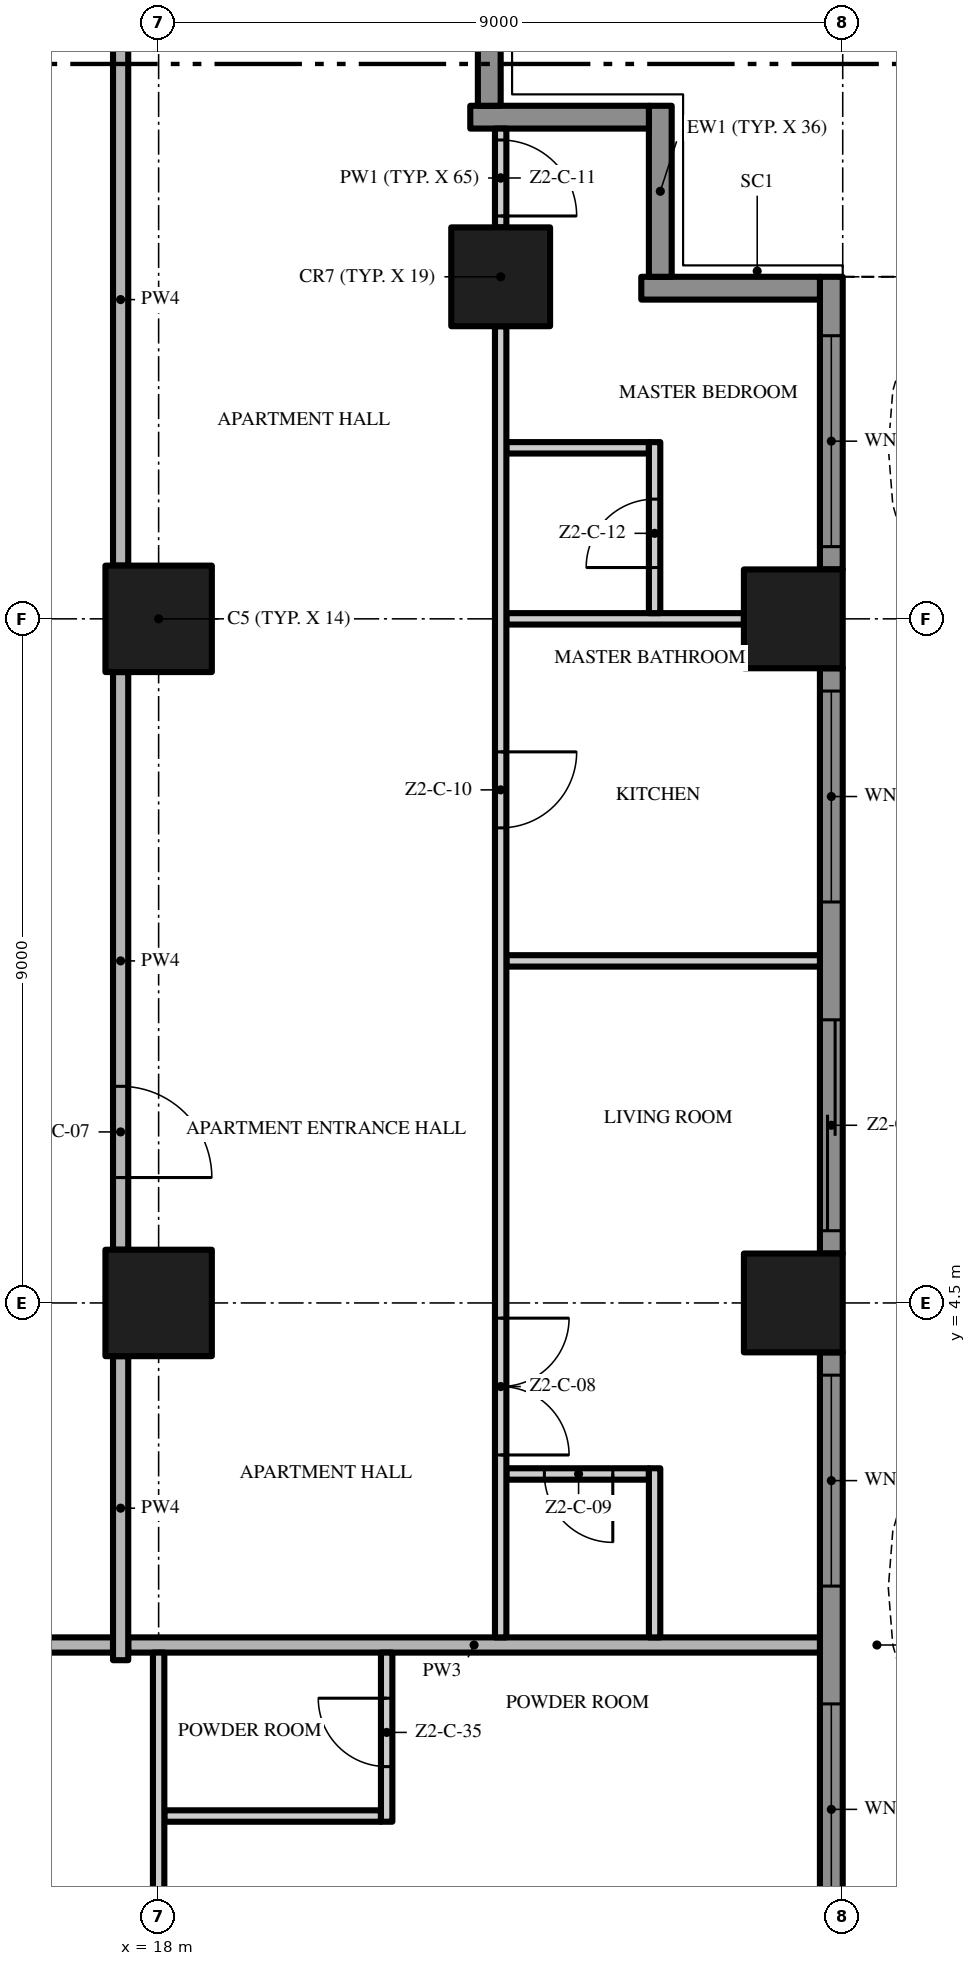
"""IFC4 building model, lengths in metres.
Left out: names, types, materials, properties, quantities, classifications, styles, units other than length and angle.
Written with IfcOpenShell. Run it as: python <this file> out.ifc"""

import sys

from ifc_helpers import new_model, si_unit, direction, frame, frame_2d, origin, origin_2d, place, context, subcontext, project, spatial, polyline, rectangle, outline, extrude, element, fill, save


model = new_model("IFC4")
c1 = context("Model", 3, precision=1e-05, world=origin(), true_north=direction((0.0, 1.0)))
c2 = subcontext(c1, "Body", "Model", "MODEL_VIEW")
j1 = project(units=[si_unit("LENGTHUNIT", "METRE"), si_unit("PLANEANGLEUNIT", "RADIAN")], contexts=[c1])
p1 = place(None, origin())
s1 = spatial("IfcSite", under=j1, at=p1, CompositionType="ELEMENT")
p2 = place(p1, origin())
s2 = spatial("IfcBuilding", under=s1, at=p2, CompositionType="ELEMENT")
p3 = place(p2, frame((0.0, 0.0, 92.2)))
s3 = spatial("IfcBuildingStorey", under=s2, at=p3, CompositionType="ELEMENT", Elevation=92.2)
for number, where, z_axis, x_axis in (
    (1, (18.0, 13.5, 0.0), (0.0, 0.0, 1.0), (1.0, 0.0, 0.0)),
    (2, (18.0, 4.5, 0.0), (0.0, 0.0, 1.0), (1.0, 0.0, 0.0)),
):
    element("IfcColumn", number, at=place(p3, frame(where, z_axis=z_axis, x_axis=x_axis)), inside=s3, PredefinedType="COLUMN", context=c2, shape_type="SweptSolid", body=[
        extrude(rectangle(XDim=1.4, YDim=1.4, at=origin_2d()), origin(), (0.0, 0.0, 1.0), 3.5),
    ])
for number, where, z_axis, x_axis in (
    (3, (26.35, 13.5, 0.0), (0.0, 0.0, 1.0), (1.0, 0.0, 0.0)),
    (4, (22.5, 18.0, 0.0), (0.0, 0.0, 1.0), (1.0, 0.0, 0.0)),
    (5, (26.35, 4.5, 0.0), (0.0, 0.0, 1.0), (1.0, 0.0, 0.0)),
):
    element("IfcColumn", number, at=place(p3, frame(where, z_axis=z_axis, x_axis=x_axis)), inside=s3, PredefinedType="COLUMN", context=c2, shape_type="SweptSolid", body=[
        extrude(rectangle(XDim=1.3, YDim=1.3, at=origin_2d()), origin(), (0.0, 0.0, 1.0), 3.5),
    ])
p4 = place(p3, frame((26.85, 3.85, 0.0), z_axis=(0.0, 0.0, 1.0), x_axis=(0.0, -1.0, 0.0)))
e6 = element("IfcWall", 6, at=p4, inside=s3, PredefinedType="SOLIDWALL", context=c2, shape_type="SweptSolid", body=[
    extrude(rectangle(XDim=7.7, YDim=0.3, at=frame_2d((3.85, 0.0))), origin(), (0.0, 0.0, 1.0), 3.5),
])
p5 = place(p4, frame((4.625, 0.0, 0.45)))
e7 = element("IfcOpeningElement", 7, at=p5, cuts=e6, PredefinedType="OPENING", context=c2, shape_type="SweptSolid", body=[
    extrude(rectangle(XDim=2.775, YDim=2.65, at=frame_2d((1.387, 1.325))), frame((0.0, 0.16, 0.0), z_axis=(0.0, -1.0, 0.0), x_axis=(1.0, 0.0, 0.0)), (0.0, 0.0, 1.0), 0.32),
])
p6 = place(p4, frame((0.3, 0.0, 0.45)))
e8 = element("IfcOpeningElement", 8, at=p6, cuts=e6, PredefinedType="OPENING", context=c2, shape_type="SweptSolid", body=[
    extrude(rectangle(XDim=2.775, YDim=2.65, at=frame_2d((1.387, 1.325))), frame((0.0, 0.16, 0.0), z_axis=(0.0, -1.0, 0.0), x_axis=(1.0, 0.0, 0.0)), (0.0, 0.0, 1.0), 0.32),
])
p7 = place(p3, frame((26.85, 12.85, 0.0), z_axis=(0.0, 0.0, 1.0), x_axis=(0.0, -1.0, 0.0)))
e9 = element("IfcWall", 9, at=p7, inside=s3, PredefinedType="SOLIDWALL", context=c2, shape_type="SweptSolid", body=[
    extrude(rectangle(XDim=7.7, YDim=0.3, at=frame_2d((3.85, 0.0))), origin(), (0.0, 0.0, 1.0), 3.5),
])
p8 = place(p7, frame((4.625, 0.0, 0.0)))
e10 = element("IfcOpeningElement", 10, at=p8, cuts=e9, PredefinedType="OPENING", context=c2, shape_type="SweptSolid", body=[
    extrude(rectangle(XDim=2.775, YDim=2.4, at=frame_2d((1.387, 1.2))), frame((0.0, 0.16, 0.0), z_axis=(0.0, -1.0, 0.0), x_axis=(1.0, 0.0, 0.0)), (0.0, 0.0, 1.0), 0.32),
])
p9 = place(p7, frame((0.3, 0.0, 0.45)))
e11 = element("IfcOpeningElement", 11, at=p9, cuts=e9, PredefinedType="OPENING", context=c2, shape_type="SweptSolid", body=[
    extrude(rectangle(XDim=2.775, YDim=2.65, at=frame_2d((1.387, 1.325))), frame((0.0, 0.16, 0.0), z_axis=(0.0, -1.0, 0.0), x_axis=(1.0, 0.0, 0.0)), (0.0, 0.0, 1.0), 0.32),
])
p10 = place(p3, frame((26.85, 18.0, 0.0), z_axis=(0.0, 0.0, 1.0), x_axis=(0.0, -1.0, 0.0)))
e12 = element("IfcWall", 12, at=p10, inside=s3, PredefinedType="SOLIDWALL", context=c2, shape_type="SweptSolid", body=[
    extrude(rectangle(XDim=3.85, YDim=0.3, at=frame_2d((1.925, 0.0))), origin(), (0.0, 0.0, 1.0), 3.5),
])
p11 = place(p10, frame((0.775, 0.0, 0.45)))
e13 = element("IfcOpeningElement", 13, at=p11, cuts=e12, PredefinedType="OPENING", context=c2, shape_type="SweptSolid", body=[
    extrude(rectangle(XDim=2.775, YDim=2.65, at=frame_2d((1.387, 1.325))), frame((0.0, 0.16, 0.0), z_axis=(0.0, -1.0, 0.0), x_axis=(1.0, 0.0, 0.0)), (0.0, 0.0, 1.0), 0.32),
])
p12 = place(p3, frame((24.35, 17.85, 0.0), z_axis=(0.0, 0.0, 1.0), x_axis=(1.0, 0.0, 0.0)))
e14 = element("IfcWall", 14, at=p12, inside=s3, PredefinedType="SOLIDWALL", context=c2, shape_type="SweptSolid", body=[
    extrude(rectangle(XDim=2.35, YDim=0.3, at=frame_2d((1.175, 0.0))), origin(), (0.0, 0.0, 1.0), 3.5),
])
p13 = place(p3, frame((24.6, 20.25, 0.0), z_axis=(0.0, 0.0, 1.0), x_axis=(0.0, -1.0, 0.0)))
e15 = element("IfcWall", 15, at=p13, inside=s3, PredefinedType="SOLIDWALL", context=c2, shape_type="SweptSolid", body=[
    extrude(rectangle(XDim=2.25, YDim=0.3, at=frame_2d((1.125, 0.0))), origin(), (0.0, 0.0, 1.0), 3.5),
])
p14 = place(p3, frame((22.1, 20.1, 0.0), z_axis=(0.0, 0.0, 1.0), x_axis=(1.0, 0.0, 0.0)))
e16 = element("IfcWall", 16, at=p14, inside=s3, PredefinedType="SOLIDWALL", context=c2, shape_type="SweptSolid", body=[
    extrude(rectangle(XDim=2.35, YDim=0.3, at=frame_2d((1.175, 0.0))), origin(), (0.0, 0.0, 1.0), 3.5),
])
p15 = place(p3, frame((22.35, 22.5, 0.0), z_axis=(0.0, 0.0, 1.0), x_axis=(0.0, -1.0, 0.0)))
e17 = element("IfcWall", 17, at=p15, inside=s3, PredefinedType="SOLIDWALL", context=c2, shape_type="SweptSolid", body=[
    extrude(rectangle(XDim=2.25, YDim=0.3, at=frame_2d((1.125, 0.0))), origin(), (0.0, 0.0, 1.0), 3.5),
])
p16 = place(p3, origin())
e18 = element("IfcWall", 18, at=p16, inside=s3, PredefinedType="USERDEFINED", context=c2, shape_type="SweptSolid", body=[
    extrude(outline(polyline([(28.8, -18.0), (28.095, -16.5), (27.659, -15.0), (27.6, -14.25), (27.659, -13.5), (28.095, -12.0), (28.8, -10.5), (29.505, -9.0), (29.941, -7.5), (30.0, -6.75), (29.941, -6.0), (29.505, -4.5), (28.8, -3.0), (28.095, -1.5), (27.659, 0.0), (27.6, 0.75), (27.659, 1.5), (28.095, 3.0), (28.8, 4.5), (29.505, 6.0), (29.941, 7.5), (30.0, 8.25), (29.941, 9.0), (29.505, 10.5), (28.8, 12.0), (28.095, 13.5), (27.659, 15.0), (27.6, 15.75), (27.659, 16.5), (28.095, 18.0), (27.855, 18.07), (27.411, 16.545), (27.349, 15.75), (27.411, 14.955), (27.86, 13.411), (28.574, 11.894), (29.271, 10.411), (29.694, 8.955), (29.749, 8.25), (29.694, 7.545), (29.271, 6.089), (28.574, 4.606), (27.86, 3.089), (27.411, 1.545), (27.349, 0.75), (27.411, -0.045), (27.86, -1.589), (28.574, -3.106), (29.271, -4.589), (29.694, -6.045), (29.749, -6.75), (29.694, -7.455), (29.271, -8.911), (28.574, -10.394), (27.86, -11.911), (27.411, -13.455), (27.349, -14.25), (27.411, -15.045), (27.86, -16.589), (28.574, -18.106), (28.8, -18.0)])), origin(), (0.0, 0.0, 1.0), 0.9),
])
p17 = place(p3, frame((18.075, -2.25, 0.0), z_axis=(0.0, 0.0, 1.0), x_axis=(1.0, 0.0, 0.0)))
e19 = element("IfcWall", 19, at=p17, inside=s3, PredefinedType="PARTITIONING", context=c2, shape_type="SweptSolid", body=[
    extrude(rectangle(XDim=2.85, YDim=0.15, at=frame_2d((1.425, 0.0))), origin(), (0.0, 0.0, 1.0), 3.5),
])
p18 = place(p3, frame((4.6, 0.0, 0.0), z_axis=(0.0, 0.0, 1.0), x_axis=(1.0, 0.0, 0.0)))
e20 = element("IfcWall", 20, at=p18, inside=s3, PredefinedType="PARTITIONING", context=c2, shape_type="SweptSolid", body=[
    extrude(rectangle(XDim=12.8, YDim=0.2, at=frame_2d((6.4, 0.0))), origin(), (0.0, 0.0, 1.0), 3.5),
])
p19 = place(p3, frame((17.6, 0.0, 0.0), z_axis=(0.0, 0.0, 1.0), x_axis=(1.0, 0.0, 0.0)))
e21 = element("IfcWall", 21, at=p19, inside=s3, PredefinedType="PARTITIONING", context=c2, shape_type="SweptSolid", body=[
    extrude(rectangle(XDim=9.1, YDim=0.2, at=frame_2d((4.55, 0.0))), origin(), (0.0, 0.0, 1.0), 3.5),
])
p20 = place(p3, frame((24.45, 2.25, 0.0), z_axis=(0.0, 0.0, 1.0), x_axis=(-1.0, 0.0, 0.0)))
e22 = element("IfcWall", 22, at=p20, inside=s3, PredefinedType="PARTITIONING", context=c2, shape_type="SweptSolid", body=[
    extrude(rectangle(XDim=1.875, YDim=0.15, at=frame_2d((0.938, 0.0))), origin(), (0.0, 0.0, 1.0), 3.5),
])
p21 = place(p20, frame((0.475, 0.0, 0.0)))
e23 = element("IfcOpeningElement", 23, at=p21, cuts=e22, PredefinedType="OPENING", context=c2, shape_type="SweptSolid", body=[
    extrude(rectangle(XDim=0.9, YDim=2.1, at=frame_2d((0.45, 1.05))), frame((0.0, 0.085, 0.0), z_axis=(0.0, -1.0, 0.0), x_axis=(1.0, 0.0, 0.0)), (0.0, 0.0, 1.0), 0.17),
])
p22 = place(p3, frame((22.575, 9.0, 0.0), z_axis=(0.0, 0.0, 1.0), x_axis=(1.0, 0.0, 0.0)))
e24 = element("IfcWall", 24, at=p22, inside=s3, PredefinedType="PARTITIONING", context=c2, shape_type="SweptSolid", body=[
    extrude(rectangle(XDim=4.125, YDim=0.15, at=frame_2d((2.062, 0.0))), origin(), (0.0, 0.0, 1.0), 3.5),
])
p23 = place(p3, frame((22.575, 13.5, 0.0), z_axis=(0.0, 0.0, 1.0), x_axis=(1.0, 0.0, 0.0)))
e25 = element("IfcWall", 25, at=p23, inside=s3, PredefinedType="PARTITIONING", context=c2, shape_type="SweptSolid", body=[
    extrude(rectangle(XDim=3.125, YDim=0.15, at=frame_2d((1.562, 0.0))), origin(), (0.0, 0.0, 1.0), 3.5),
])
p24 = place(p3, frame((22.575, 15.75, 0.0), z_axis=(0.0, 0.0, 1.0), x_axis=(1.0, 0.0, 0.0)))
e26 = element("IfcWall", 26, at=p24, inside=s3, PredefinedType="PARTITIONING", context=c2, shape_type="SweptSolid", body=[
    extrude(rectangle(XDim=1.875, YDim=0.15, at=frame_2d((0.938, 0.0))), origin(), (0.0, 0.0, 1.0), 3.5),
])
p25 = place(p3, frame((17.5, -0.2, 0.0), z_axis=(0.0, 0.0, 1.0), x_axis=(0.0, 1.0, 0.0)))
e27 = element("IfcWall", 27, at=p25, inside=s3, PredefinedType="PARTITIONING", context=c2, shape_type="SweptSolid", body=[
    extrude(rectangle(XDim=4.0, YDim=0.2, at=frame_2d((2.0, 0.0))), origin(), (0.0, 0.0, 1.0), 3.5),
])
p26 = place(p3, frame((17.5, 12.8, 0.0), z_axis=(0.0, 0.0, 1.0), x_axis=(0.0, -1.0, 0.0)))
e28 = element("IfcWall", 28, at=p26, inside=s3, PredefinedType="PARTITIONING", context=c2, shape_type="SweptSolid", body=[
    extrude(rectangle(XDim=7.6, YDim=0.2, at=frame_2d((3.8, 0.0))), origin(), (0.0, 0.0, 1.0), 3.5),
])
p27 = place(p26, frame((5.45, 0.0, 0.0)))
e29 = element("IfcOpeningElement", 29, at=p27, cuts=e28, PredefinedType="OPENING", context=c2, shape_type="SweptSolid", body=[
    extrude(rectangle(XDim=1.2, YDim=2.4, at=frame_2d((0.6, 1.2))), frame((0.0, 0.11, 0.0), z_axis=(0.0, -1.0, 0.0), x_axis=(1.0, 0.0, 0.0)), (0.0, 0.0, 1.0), 0.22),
])
p28 = place(p3, frame((17.5, 14.2, 0.0), z_axis=(0.0, 0.0, 1.0), x_axis=(0.0, 1.0, 0.0)))
e30 = element("IfcWall", 30, at=p28, inside=s3, PredefinedType="PARTITIONING", context=c2, shape_type="SweptSolid", body=[
    extrude(rectangle(XDim=7.0, YDim=0.2, at=frame_2d((3.5, 0.0))), origin(), (0.0, 0.0, 1.0), 3.5),
])
p29 = place(p3, frame((18.0, -3.8, 0.0), z_axis=(0.0, 0.0, 1.0), x_axis=(0.0, 1.0, 0.0)))
e31 = element("IfcWall", 31, at=p29, inside=s3, PredefinedType="PARTITIONING", context=c2, shape_type="SweptSolid", body=[
    extrude(rectangle(XDim=3.7, YDim=0.15, at=frame_2d((1.85, 0.0))), origin(), (0.0, 0.0, 1.0), 3.5),
])
p30 = place(p3, frame((21.0, -2.325, 0.0), z_axis=(0.0, 0.0, 1.0), x_axis=(0.0, 1.0, 0.0)))
e32 = element("IfcWall", 32, at=p30, inside=s3, PredefinedType="PARTITIONING", context=c2, shape_type="SweptSolid", body=[
    extrude(rectangle(XDim=2.225, YDim=0.15, at=frame_2d((1.113, 0.0))), origin(), (0.0, 0.0, 1.0), 3.5),
])
p31 = place(p30, frame((0.725, 0.0, 0.0)))
e33 = element("IfcOpeningElement", 33, at=p31, cuts=e32, PredefinedType="OPENING", context=c2, shape_type="SweptSolid", body=[
    extrude(rectangle(XDim=0.9, YDim=2.1, at=frame_2d((0.45, 1.05))), frame((0.0, 0.085, 0.0), z_axis=(0.0, -1.0, 0.0), x_axis=(1.0, 0.0, 0.0)), (0.0, 0.0, 1.0), 0.17),
])
p32 = place(p3, frame((22.5, 17.35, 0.0), z_axis=(0.0, 0.0, 1.0), x_axis=(0.0, -1.0, 0.0)))
e34 = element("IfcWall", 34, at=p32, inside=s3, PredefinedType="PARTITIONING", context=c2, shape_type="SweptSolid", body=[
    extrude(rectangle(XDim=17.25, YDim=0.15, at=frame_2d((8.625, 0.0))), origin(), (0.0, 0.0, 1.0), 3.5),
])
p33 = place(p32, frame((13.05, 0.0, 0.0)))
e35 = element("IfcOpeningElement", 35, at=p33, cuts=e34, PredefinedType="OPENING", context=c2, shape_type="SweptSolid", body=[
    extrude(rectangle(XDim=1.8, YDim=2.4, at=frame_2d((0.9, 1.2))), frame((0.0, 0.085, 0.0), z_axis=(0.0, -1.0, 0.0), x_axis=(1.0, 0.0, 0.0)), (0.0, 0.0, 1.0), 0.17),
])
p34 = place(p32, frame((5.6, 0.0, 0.0)))
e36 = element("IfcOpeningElement", 36, at=p34, cuts=e34, PredefinedType="OPENING", context=c2, shape_type="SweptSolid", body=[
    extrude(rectangle(XDim=1.0, YDim=2.4, at=frame_2d((0.5, 1.2))), frame((0.0, 0.085, 0.0), z_axis=(0.0, -1.0, 0.0), x_axis=(1.0, 0.0, 0.0)), (0.0, 0.0, 1.0), 0.17),
])
p35 = place(p3, frame((22.5, 19.95, 0.0), z_axis=(0.0, 0.0, 1.0), x_axis=(0.0, -1.0, 0.0)))
e37 = element("IfcWall", 37, at=p35, inside=s3, PredefinedType="PARTITIONING", context=c2, shape_type="SweptSolid", body=[
    extrude(rectangle(XDim=1.3, YDim=0.15, at=frame_2d((0.65, 0.0))), origin(), (0.0, 0.0, 1.0), 3.5),
])
p36 = place(p35, frame((0.15, 0.0, 0.0)))
e38 = element("IfcOpeningElement", 38, at=p36, cuts=e37, PredefinedType="OPENING", context=c2, shape_type="SweptSolid", body=[
    extrude(rectangle(XDim=1.0, YDim=2.4, at=frame_2d((0.5, 1.2))), frame((0.0, 0.085, 0.0), z_axis=(0.0, -1.0, 0.0), x_axis=(1.0, 0.0, 0.0)), (0.0, 0.0, 1.0), 0.17),
])
p37 = place(p3, frame((24.525, 0.1, 0.0), z_axis=(0.0, 0.0, 1.0), x_axis=(0.0, 1.0, 0.0)))
e39 = element("IfcWall", 39, at=p37, inside=s3, PredefinedType="PARTITIONING", context=c2, shape_type="SweptSolid", body=[
    extrude(rectangle(XDim=2.225, YDim=0.15, at=frame_2d((1.113, 0.0))), origin(), (0.0, 0.0, 1.0), 3.5),
])
p38 = place(p3, frame((24.525, 13.575, 0.0), z_axis=(0.0, 0.0, 1.0), x_axis=(0.0, 1.0, 0.0)))
e40 = element("IfcWall", 40, at=p38, inside=s3, PredefinedType="PARTITIONING", context=c2, shape_type="SweptSolid", body=[
    extrude(rectangle(XDim=2.25, YDim=0.15, at=frame_2d((1.125, 0.0))), origin(), (0.0, 0.0, 1.0), 3.5),
])
p39 = place(p38, frame((0.6, 0.0, 0.0)))
e41 = element("IfcOpeningElement", 41, at=p39, cuts=e40, PredefinedType="OPENING", context=c2, shape_type="SweptSolid", body=[
    extrude(rectangle(XDim=0.9, YDim=2.1, at=frame_2d((0.45, 1.05))), frame((0.0, 0.085, 0.0), z_axis=(0.0, -1.0, 0.0), x_axis=(1.0, 0.0, 0.0)), (0.0, 0.0, 1.0), 0.17),
])
p40 = place(p5, origin())
e42 = element("IfcWindow", 42, at=p40, inside=s3, PartitioningType="SINGLE_PANEL", PredefinedType="WINDOW", context=c2, shape_type="SweptSolid", body=[
    extrude(rectangle(XDim=2.775, YDim=2.65, at=frame_2d((1.387, 1.325))), frame((0.0, 0.03, 0.0), z_axis=(0.0, -1.0, 0.0), x_axis=(1.0, 0.0, 0.0)), (0.0, 0.0, 1.0), 0.06),
])
fill(e7, e42)
p41 = place(p6, origin())
e43 = element("IfcWindow", 43, at=p41, inside=s3, PartitioningType="SINGLE_PANEL", PredefinedType="WINDOW", context=c2, shape_type="SweptSolid", body=[
    extrude(rectangle(XDim=2.775, YDim=2.65, at=frame_2d((1.387, 1.325))), frame((0.0, 0.03, 0.0), z_axis=(0.0, -1.0, 0.0), x_axis=(1.0, 0.0, 0.0)), (0.0, 0.0, 1.0), 0.06),
])
fill(e8, e43)
p42 = place(p8, origin())
e44 = element("IfcDoor", 44, at=p42, inside=s3, OperationType="SINGLE_SWING_LEFT", PredefinedType="DOOR", context=c2, shape_type="SweptSolid", body=[
    extrude(rectangle(XDim=2.775, YDim=2.4, at=frame_2d((1.387, 1.2))), frame((0.0, 0.025, 0.0), z_axis=(0.0, -1.0, 0.0), x_axis=(1.0, 0.0, 0.0)), (0.0, 0.0, 1.0), 0.05),
])
fill(e10, e44)
p43 = place(p9, origin())
e45 = element("IfcWindow", 45, at=p43, inside=s3, PartitioningType="SINGLE_PANEL", PredefinedType="WINDOW", context=c2, shape_type="SweptSolid", body=[
    extrude(rectangle(XDim=2.775, YDim=2.65, at=frame_2d((1.387, 1.325))), frame((0.0, 0.03, 0.0), z_axis=(0.0, -1.0, 0.0), x_axis=(1.0, 0.0, 0.0)), (0.0, 0.0, 1.0), 0.06),
])
fill(e11, e45)
p44 = place(p11, origin())
e46 = element("IfcWindow", 46, at=p44, inside=s3, PartitioningType="SINGLE_PANEL", PredefinedType="WINDOW", context=c2, shape_type="SweptSolid", body=[
    extrude(rectangle(XDim=2.775, YDim=2.65, at=frame_2d((1.387, 1.325))), frame((0.0, 0.03, 0.0), z_axis=(0.0, -1.0, 0.0), x_axis=(1.0, 0.0, 0.0)), (0.0, 0.0, 1.0), 0.06),
])
fill(e13, e46)
p45 = place(p27, origin())
e47 = element("IfcDoor", 47, at=p45, inside=s3, OperationType="SINGLE_SWING_RIGHT", PredefinedType="DOOR", context=c2, shape_type="SweptSolid", body=[
    extrude(rectangle(XDim=1.2, YDim=2.4, at=frame_2d((0.6, 1.2))), frame((0.0, 0.025, 0.0), z_axis=(0.0, -1.0, 0.0), x_axis=(1.0, 0.0, 0.0)), (0.0, 0.0, 1.0), 0.05),
])
fill(e29, e47)
p46 = place(p33, origin())
e48 = element("IfcDoor", 48, at=p46, inside=s3, OperationType="DOUBLE_DOOR_SINGLE_SWING", PredefinedType="DOOR", context=c2, shape_type="SweptSolid", body=[
    extrude(rectangle(XDim=1.8, YDim=2.4, at=frame_2d((0.9, 1.2))), frame((0.0, 0.025, 0.0), z_axis=(0.0, -1.0, 0.0), x_axis=(1.0, 0.0, 0.0)), (0.0, 0.0, 1.0), 0.05),
])
fill(e35, e48)
p47 = place(p21, origin())
e49 = element("IfcDoor", 49, at=p47, inside=s3, OperationType="SINGLE_SWING_LEFT", PredefinedType="DOOR", context=c2, shape_type="SweptSolid", body=[
    extrude(rectangle(XDim=0.9, YDim=2.1, at=frame_2d((0.45, 1.05))), frame((0.0, 0.025, 0.0), z_axis=(0.0, -1.0, 0.0), x_axis=(1.0, 0.0, 0.0)), (0.0, 0.0, 1.0), 0.05),
])
fill(e23, e49)
p48 = place(p34, origin())
e50 = element("IfcDoor", 50, at=p48, inside=s3, OperationType="SINGLE_SWING_LEFT", PredefinedType="DOOR", context=c2, shape_type="SweptSolid", body=[
    extrude(rectangle(XDim=1.0, YDim=2.4, at=frame_2d((0.5, 1.2))), frame((0.0, 0.025, 0.0), z_axis=(0.0, -1.0, 0.0), x_axis=(1.0, 0.0, 0.0)), (0.0, 0.0, 1.0), 0.05),
])
fill(e36, e50)
p49 = place(p36, origin())
e51 = element("IfcDoor", 51, at=p49, inside=s3, OperationType="SINGLE_SWING_RIGHT", PredefinedType="DOOR", context=c2, shape_type="SweptSolid", body=[
    extrude(rectangle(XDim=1.0, YDim=2.4, at=frame_2d((0.5, 1.2))), frame((0.0, 0.025, 0.0), z_axis=(0.0, -1.0, 0.0), x_axis=(1.0, 0.0, 0.0)), (0.0, 0.0, 1.0), 0.05),
])
fill(e38, e51)
p50 = place(p39, origin())
e52 = element("IfcDoor", 52, at=p50, inside=s3, OperationType="SINGLE_SWING_LEFT", PredefinedType="DOOR", context=c2, shape_type="SweptSolid", body=[
    extrude(rectangle(XDim=0.9, YDim=2.1, at=frame_2d((0.45, 1.05))), frame((0.0, 0.025, 0.0), z_axis=(0.0, -1.0, 0.0), x_axis=(1.0, 0.0, 0.0)), (0.0, 0.0, 1.0), 0.05),
])
fill(e41, e52)
p51 = place(p31, origin())
e53 = element("IfcDoor", 53, at=p51, inside=s3, OperationType="SINGLE_SWING_RIGHT", PredefinedType="DOOR", context=c2, shape_type="SweptSolid", body=[
    extrude(rectangle(XDim=0.9, YDim=2.1, at=frame_2d((0.45, 1.05))), frame((0.0, 0.025, 0.0), z_axis=(0.0, -1.0, 0.0), x_axis=(1.0, 0.0, 0.0)), (0.0, 0.0, 1.0), 0.05),
])
fill(e33, e53)
save(model, sys.argv[1])
